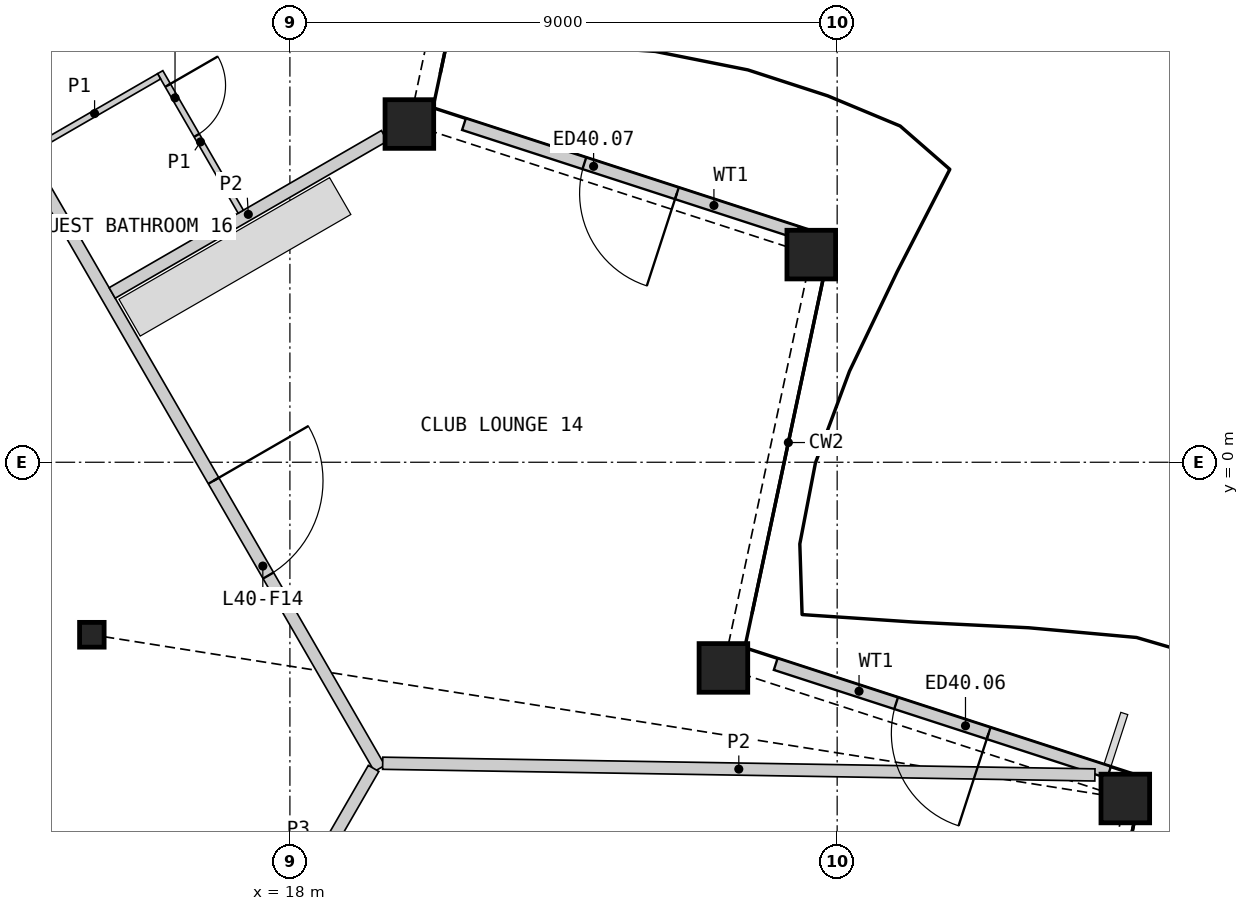
"""IFC4 building model, lengths in metres.
Left out: names, types, materials, properties, quantities, classifications, styles, units other than length and angle.
Written with IfcOpenShell. Run it as: python <this file> out.ifc"""

import sys

from ifc_helpers import new_model, si_unit, direction, frame, frame_2d, origin, origin_2d, place, context, subcontext, project, spatial, rectangle, hollow_rectangle, i_section, extrude, element, fill, save


model = new_model("IFC4")
c1 = context("Model", 3, precision=1e-05, world=origin(), true_north=direction((0.0, 1.0)))
c2 = subcontext(c1, "Body", "Model", "MODEL_VIEW")
j1 = project(units=[si_unit("LENGTHUNIT", "METRE"), si_unit("PLANEANGLEUNIT", "RADIAN")], contexts=[c1])
p1 = place(None, origin())
s1 = spatial("IfcSite", under=j1, at=p1, CompositionType="ELEMENT")
p2 = place(p1, origin())
s2 = spatial("IfcBuilding", under=s1, at=p2, CompositionType="ELEMENT")
p3 = place(p2, frame((0.0, 0.0, 187.2)))
s3 = spatial("IfcBuildingStorey", under=s2, at=p3, CompositionType="ELEMENT", Elevation=187.2)
for number, where, z_axis, x_axis in (
    (1, (31.739, -5.53, 0.0), (0.0, 0.0, 1.0), (1.0, 0.0, 0.0)),
    (2, (25.129, -3.383, 0.0), (0.0, 0.0, 1.0), (1.0, 0.0, 0.0)),
    (3, (26.574, 3.415, 0.0), (0.0, 0.0, 1.0), (1.0, 0.0, 0.0)),
    (4, (19.965, 5.563, 0.0), (0.0, 0.0, 1.0), (1.0, 0.0, 0.0)),
):
    element("IfcColumn", number, at=place(p3, frame(where, z_axis=z_axis, x_axis=x_axis)), inside=s3, PredefinedType="COLUMN", context=c2, shape_type="SweptSolid", body=[
        extrude(hollow_rectangle(XDim=0.8, YDim=0.8, WallThickness=0.05, at=origin_2d()), origin(), (0.0, 0.0, 1.0), 3.6),
    ])
p4 = place(p3, frame((14.743, -2.837, 0.0), z_axis=(0.0, 0.0, 1.0), x_axis=(1.0, 0.0, 0.0)))
e5 = element("IfcColumn", 5, at=p4, inside=s3, PredefinedType="COLUMN", context=c2, shape_type="SweptSolid", body=[
    extrude(i_section(OverallWidth=0.404, OverallDepth=0.407, WebThickness=0.027, FlangeThickness=0.044, at=origin_2d()), origin(), (0.0, 0.0, 1.0), 3.6),
])
p5 = place(p3, frame((31.471, -5.101, 0.0), z_axis=(0.0, 0.0, 1.0), x_axis=(-0.951053678976, 0.30902572661, 0.0)))
e6 = element("IfcWall", 6, at=p5, inside=s3, PredefinedType="SOLIDWALL", context=c2, shape_type="SweptSolid", body=[
    extrude(rectangle(XDim=5.763, YDim=0.2, at=frame_2d((2.882, 0.0))), origin(), (0.0, 0.0, 1.0), 2.701),
])
p6 = place(p5, frame((2.082, 0.0, 0.0)))
e7 = element("IfcOpeningElement", 7, at=p6, cuts=e6, PredefinedType="OPENING", context=c2, shape_type="SweptSolid", body=[
    extrude(rectangle(XDim=1.6, YDim=2.4, at=frame_2d((0.8, 1.2))), frame((0.0, 0.11, 0.0), z_axis=(0.0, -1.0, 0.0), x_axis=(1.0, 0.0, 0.0)), (0.0, 0.0, 1.0), 0.22),
])
p7 = place(p3, frame((26.344, 3.779, 0.0), z_axis=(0.0, 0.0, 1.0), x_axis=(-0.951049633358, 0.309038177075, 0.0)))
e8 = element("IfcWall", 8, at=p7, inside=s3, PredefinedType="SOLIDWALL", context=c2, shape_type="SweptSolid", body=[
    extrude(rectangle(XDim=5.763, YDim=0.2, at=frame_2d((2.881, 0.0))), origin(), (0.0, 0.0, 1.0), 2.701),
])
p8 = place(p7, frame((2.082, 0.0, 0.0)))
e9 = element("IfcOpeningElement", 9, at=p8, cuts=e8, PredefinedType="OPENING", context=c2, shape_type="SweptSolid", body=[
    extrude(rectangle(XDim=1.6, YDim=2.4, at=frame_2d((0.8, 1.2))), frame((0.0, 0.11, 0.0), z_axis=(0.0, -1.0, 0.0), x_axis=(1.0, 0.0, 0.0)), (0.0, 0.0, 1.0), 0.22),
])
p9 = place(p3, frame((14.526, -8.011, 0.0), z_axis=(0.0, 0.0, 1.0), x_axis=(-0.499996970966, 0.866027152591, 0.0)))
e10 = element("IfcWall", 10, at=p9, inside=s3, PredefinedType="SHEAR", context=c2, shape_type="SweptSolid", body=[
    extrude(rectangle(XDim=3.798, YDim=0.75, at=frame_2d((1.899, 0.0))), origin(), (0.0, 0.0, 1.0), 3.25),
])
p10 = place(p3, frame((5.377, 19.385, 0.0), z_axis=(0.0, 0.0, 1.0), x_axis=(0.500000757641, -0.86602496636, 0.0)))
e11 = element("IfcWall", 11, at=p10, inside=s3, PredefinedType="PARTITIONING", context=c2, shape_type="SweptSolid", body=[
    extrude(rectangle(XDim=28.198, YDim=0.2, at=frame_2d((14.099, 0.0))), origin(), (0.0, 0.0, 1.0), 3.25),
])
p11 = place(p10, frame((22.735, 0.0, 0.0)))
e12 = element("IfcOpeningElement", 12, at=p11, cuts=e11, PredefinedType="OPENING", context=c2, shape_type="SweptSolid", body=[
    extrude(rectangle(XDim=1.8, YDim=2.1, at=frame_2d((0.9, 1.05))), frame((0.0, 0.11, 0.0), z_axis=(0.0, -1.0, 0.0), x_axis=(1.0, 0.0, 0.0)), (0.0, 0.0, 1.0), 0.22),
])
p12 = place(p10, frame((14.402, 0.0, 0.0)))
e13 = element("IfcOpeningElement", 13, at=p12, cuts=e11, PredefinedType="OPENING", context=c2, shape_type="SweptSolid", body=[
    extrude(rectangle(XDim=1.0, YDim=2.1, at=frame_2d((0.5, 1.05))), frame((0.0, 0.11, 0.0), z_axis=(0.0, -1.0, 0.0), x_axis=(1.0, 0.0, 0.0)), (0.0, 0.0, 1.0), 0.22),
])
p13 = place(p10, frame((12.796, 0.0, 0.0)))
e14 = element("IfcOpeningElement", 14, at=p13, cuts=e11, PredefinedType="OPENING", context=c2, shape_type="SweptSolid", body=[
    extrude(rectangle(XDim=1.0, YDim=2.1, at=frame_2d((0.5, 1.05))), frame((0.0, 0.11, 0.0), z_axis=(0.0, -1.0, 0.0), x_axis=(1.0, 0.0, 0.0)), (0.0, 0.0, 1.0), 0.22),
])
p14 = place(p10, frame((4.164, 0.0, 0.0)))
e15 = element("IfcOpeningElement", 15, at=p14, cuts=e11, PredefinedType="OPENING", context=c2, shape_type="SweptSolid", body=[
    extrude(rectangle(XDim=1.0, YDim=2.1, at=frame_2d((0.5, 1.05))), frame((0.0, 0.11, 0.0), z_axis=(0.0, -1.0, 0.0), x_axis=(1.0, 0.0, 0.0)), (0.0, 0.0, 1.0), 0.22),
])
p15 = place(p10, frame((1.452, 0.0, 0.0)))
e16 = element("IfcOpeningElement", 16, at=p15, cuts=e11, PredefinedType="OPENING", context=c2, shape_type="SweptSolid", body=[
    extrude(rectangle(XDim=0.95, YDim=2.1, at=frame_2d((0.475, 1.05))), frame((0.0, 0.11, 0.0), z_axis=(0.0, -1.0, 0.0), x_axis=(1.0, 0.0, 0.0)), (0.0, 0.0, 1.0), 0.22),
])
p16 = place(p3, frame((17.875, -7.635, 0.0), z_axis=(0.0, 0.0, 1.0), x_axis=(0.499952404951, 0.866052881055, 0.0)))
e17 = element("IfcWall", 17, at=p16, inside=s3, PredefinedType="PARTITIONING", context=c2, shape_type="SweptSolid", body=[
    extrude(rectangle(XDim=3.002, YDim=0.2, at=frame_2d((1.501, 0.0))), origin(), (0.0, 0.0, 1.0), 3.25),
])
p17 = place(p3, frame((19.526, -4.95, 0.0), z_axis=(0.0, 0.0, 1.0), x_axis=(0.99986514458, -0.016422321819, 0.0)))
e18 = element("IfcWall", 18, at=p17, inside=s3, PredefinedType="PARTITIONING", context=c2, shape_type="SweptSolid", body=[
    extrude(rectangle(XDim=11.715, YDim=0.2, at=frame_2d((5.857, 0.0))), origin(), (0.0, 0.0, 1.0), 2.404),
])
p18 = place(p3, frame((15.077, 2.784, 0.0), z_axis=(0.0, 0.0, 1.0), x_axis=(0.866020469142, 0.500008546953, 0.0)))
e19 = element("IfcWall", 19, at=p18, inside=s3, PredefinedType="PARTITIONING", context=c2, shape_type="SweptSolid", body=[
    extrude(rectangle(XDim=5.171, YDim=0.2, at=frame_2d((2.585, 0.0))), origin(), (0.0, 0.0, 1.0), 2.404),
])
p19 = place(p3, frame((15.867, 6.416, 0.0), z_axis=(0.0, 0.0, 1.0), x_axis=(0.500062700197, -0.865989200783, 0.0)))
e20 = element("IfcWall", 20, at=p19, inside=s3, PredefinedType="PARTITIONING", context=c2, shape_type="SweptSolid", body=[
    extrude(rectangle(XDim=2.65, YDim=0.1, at=frame_2d((1.325, 0.0))), origin(), (0.0, 0.0, 1.0), 2.404),
])
p20 = place(p19, frame((0.25, 0.0, 0.0)))
e21 = element("IfcOpeningElement", 21, at=p20, cuts=e20, PredefinedType="OPENING", context=c2, shape_type="SweptSolid", body=[
    extrude(rectangle(XDim=0.95, YDim=2.1, at=frame_2d((0.475, 1.05))), frame((0.0, 0.06, 0.0), z_axis=(0.0, -1.0, 0.0), x_axis=(1.0, 0.0, 0.0)), (0.0, 0.0, 1.0), 0.12),
])
p21 = place(p3, frame((13.727, 5.123, 0.0), z_axis=(0.0, 0.0, 1.0), x_axis=(0.866032905446, 0.499987006516, 0.0)))
e22 = element("IfcWall", 22, at=p21, inside=s3, PredefinedType="PARTITIONING", context=c2, shape_type="SweptSolid", body=[
    extrude(rectangle(XDim=2.45, YDim=0.1, at=frame_2d((1.225, 0.0))), origin(), (0.0, 0.0, 1.0), 2.404),
])
p22 = place(p6, origin())
e23 = element("IfcDoor", 23, at=p22, inside=s3, OperationType="DOUBLE_DOOR_SINGLE_SWING", PredefinedType="DOOR", context=c2, shape_type="SweptSolid", body=[
    extrude(rectangle(XDim=1.6, YDim=2.4, at=frame_2d((0.8, 1.2))), frame((0.0, 0.025, 0.0), z_axis=(0.0, -1.0, 0.0), x_axis=(1.0, 0.0, 0.0)), (0.0, 0.0, 1.0), 0.05),
])
fill(e7, e23)
p23 = place(p8, origin())
e24 = element("IfcDoor", 24, at=p23, inside=s3, OperationType="DOUBLE_DOOR_SINGLE_SWING", PredefinedType="DOOR", context=c2, shape_type="SweptSolid", body=[
    extrude(rectangle(XDim=1.6, YDim=2.4, at=frame_2d((0.8, 1.2))), frame((0.0, 0.025, 0.0), z_axis=(0.0, -1.0, 0.0), x_axis=(1.0, 0.0, 0.0)), (0.0, 0.0, 1.0), 0.05),
])
fill(e9, e24)
p24 = place(p11, origin())
e25 = element("IfcDoor", 25, at=p24, inside=s3, OperationType="DOUBLE_DOOR_SINGLE_SWING", PredefinedType="DOOR", context=c2, shape_type="SweptSolid", body=[
    extrude(rectangle(XDim=1.8, YDim=2.1, at=frame_2d((0.9, 1.05))), frame((0.0, 0.025, 0.0), z_axis=(0.0, -1.0, 0.0), x_axis=(1.0, 0.0, 0.0)), (0.0, 0.0, 1.0), 0.05),
])
fill(e12, e25)
p25 = place(p20, origin())
e26 = element("IfcDoor", 26, at=p25, inside=s3, OperationType="SINGLE_SWING_LEFT", PredefinedType="DOOR", context=c2, shape_type="SweptSolid", body=[
    extrude(rectangle(XDim=0.95, YDim=2.1, at=frame_2d((0.475, 1.05))), frame((0.0, 0.025, 0.0), z_axis=(0.0, -1.0, 0.0), x_axis=(1.0, 0.0, 0.0)), (0.0, 0.0, 1.0), 0.05),
])
fill(e21, e26)
save(model, sys.argv[1])
